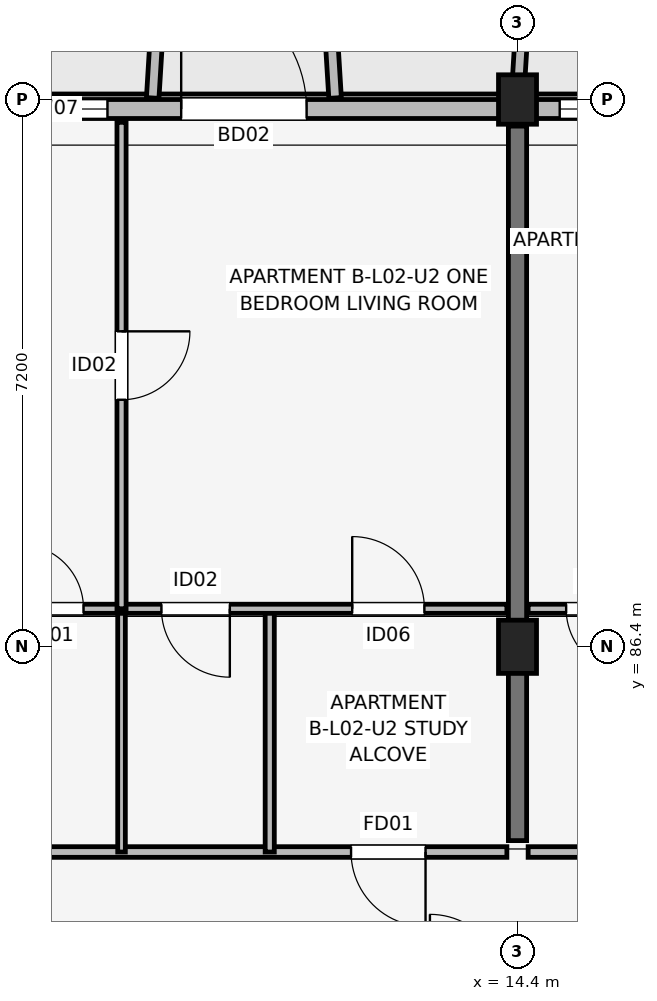
"""IFC4 building model, lengths in metres.
Left out: names, types, materials, properties, quantities, classifications, styles, units other than length and angle.
Written with IfcOpenShell. Run it as: python <this file> out.ifc"""

import sys

from ifc_helpers import new_model, si_unit, direction, frame, frame_2d, origin, origin_2d, place, context, subcontext, project, spatial, rectangle, extrude, element, fill, save


model = new_model("IFC4")
c1 = context("Model", 3, precision=1e-05, world=origin(), true_north=direction((0.0, 1.0)))
c2 = subcontext(c1, "Body", "Model", "MODEL_VIEW")
j1 = project(units=[si_unit("LENGTHUNIT", "METRE"), si_unit("PLANEANGLEUNIT", "RADIAN")], contexts=[c1])
p1 = place(None, origin())
s1 = spatial("IfcSite", under=j1, at=p1, CompositionType="ELEMENT")
p2 = place(p1, origin())
s2 = spatial("IfcBuilding", under=s1, at=p2, CompositionType="ELEMENT")
p3 = place(p2, frame((0.0, 0.0, 8.7)))
s3 = spatial("IfcBuildingStorey", under=s2, at=p3, CompositionType="ELEMENT", Elevation=8.7)
p4 = place(p3, frame((14.4, 86.4, 0.0), z_axis=(0.0, 0.0, 1.0), x_axis=(1.0, 0.0, 0.0)))
e1 = element("IfcColumn", 1, at=p4, inside=s3, PredefinedType="COLUMN", context=c2, shape_type="SweptSolid", body=[
    extrude(rectangle(XDim=0.5, YDim=0.7, at=origin_2d()), origin(), (0.0, 0.0, 1.0), 3.15),
])
p5 = place(p3, frame((14.4, 93.6, 0.0), z_axis=(0.0, 0.0, 1.0), x_axis=(1.0, 0.0, 0.0)))
e2 = element("IfcColumn", 2, at=p5, inside=s3, PredefinedType="COLUMN", context=c2, shape_type="SweptSolid", body=[
    extrude(rectangle(XDim=0.5, YDim=0.65, at=origin_2d()), origin(), (0.0, 0.0, 1.0), 3.15),
])
p6 = place(p3, frame((14.4, 83.85, 0.0), z_axis=(0.0, 0.0, 1.0), x_axis=(0.0, 1.0, 0.0)))
e3 = element("IfcWall", 3, at=p6, inside=s3, PredefinedType="SHEAR", context=c2, shape_type="SweptSolid", body=[
    extrude(rectangle(XDim=9.4, YDim=0.24, at=frame_2d((4.7, 0.0))), origin(), (0.0, 0.0, 1.0), 3.15),
])
p7 = place(p3, frame((32.8, 93.475, 0.0), z_axis=(0.0, 0.0, 1.0), x_axis=(-1.0, 0.0, 0.0)))
e4 = element("IfcWall", 4, at=p7, inside=s3, PredefinedType="SOLIDWALL", context=c2, shape_type="SweptSolid", body=[
    extrude(rectangle(XDim=29.6, YDim=0.25, at=frame_2d((14.8, 0.0))), origin(), (0.0, 0.0, 1.0), 2.43),
])
p8 = place(p7, frame((22.825, 0.0, 0.0), z_axis=(0.0, 0.0, 1.0), x_axis=(-1.0, 0.0, 0.0)))
e5 = element("IfcOpeningElement", 5, at=p8, cuts=e4, PredefinedType="OPENING", context=c2, shape_type="SweptSolid", body=[
    extrude(rectangle(XDim=1.65, YDim=2.15, at=frame_2d((0.825, 1.075))), frame((0.0, 0.135, 0.0), z_axis=(0.0, -1.0, 0.0), x_axis=(1.0, 0.0, 0.0)), (0.0, 0.0, 1.0), 0.27),
])
p9 = place(p7, frame((8.35, 0.0, 0.0), z_axis=(0.0, 0.0, 1.0), x_axis=(-1.0, 0.0, 0.0)))
e6 = element("IfcOpeningElement", 6, at=p9, cuts=e4, PredefinedType="OPENING", context=c2, shape_type="SweptSolid", body=[
    extrude(rectangle(XDim=1.5, YDim=2.15, at=frame_2d((0.75, 1.075))), frame((0.0, 0.135, 0.0), z_axis=(0.0, -1.0, 0.0), x_axis=(1.0, 0.0, 0.0)), (0.0, 0.0, 1.0), 0.27),
])
p10 = place(p7, frame((26.025, 0.0, 0.75)))
e7 = element("IfcOpeningElement", 7, at=p10, cuts=e4, PredefinedType="OPENING", context=c2, shape_type="SweptSolid", body=[
    extrude(rectangle(XDim=1.22, YDim=1.5, at=frame_2d((0.61, 0.75))), frame((0.0, 0.135, 0.0), z_axis=(0.0, -1.0, 0.0), x_axis=(1.0, 0.0, 0.0)), (0.0, 0.0, 1.0), 0.27),
])
p11 = place(p7, frame((23.795, 0.0, 0.75)))
e8 = element("IfcOpeningElement", 8, at=p11, cuts=e4, PredefinedType="OPENING", context=c2, shape_type="SweptSolid", body=[
    extrude(rectangle(XDim=1.34, YDim=1.55, at=frame_2d((0.67, 0.775))), frame((0.0, 0.135, 0.0), z_axis=(0.0, -1.0, 0.0), x_axis=(1.0, 0.0, 0.0)), (0.0, 0.0, 1.0), 0.27),
])
p12 = place(p7, frame((16.265, 0.0, 0.7)))
e9 = element("IfcOpeningElement", 9, at=p12, cuts=e4, PredefinedType="OPENING", context=c2, shape_type="SweptSolid", body=[
    extrude(rectangle(XDim=1.58, YDim=1.6, at=frame_2d((0.79, 0.8))), frame((0.0, 0.135, 0.0), z_axis=(0.0, -1.0, 0.0), x_axis=(1.0, 0.0, 0.0)), (0.0, 0.0, 1.0), 0.27),
])
p13 = place(p7, frame((12.245, 0.0, 0.75)))
e10 = element("IfcOpeningElement", 10, at=p13, cuts=e4, PredefinedType="OPENING", context=c2, shape_type="SweptSolid", body=[
    extrude(rectangle(XDim=0.6, YDim=1.25, at=frame_2d((0.3, 0.625))), frame((0.0, 0.135, 0.0), z_axis=(0.0, -1.0, 0.0), x_axis=(1.0, 0.0, 0.0)), (0.0, 0.0, 1.0), 0.27),
])
p14 = place(p7, frame((9.705, 0.0, 0.75)))
e11 = element("IfcOpeningElement", 11, at=p14, cuts=e4, PredefinedType="OPENING", context=c2, shape_type="SweptSolid", body=[
    extrude(rectangle(XDim=0.72, YDim=1.35, at=frame_2d((0.36, 0.675))), frame((0.0, 0.135, 0.0), z_axis=(0.0, -1.0, 0.0), x_axis=(1.0, 0.0, 0.0)), (0.0, 0.0, 1.0), 0.27),
])
p15 = place(p7, frame((2.44, 0.0, 0.75)))
e12 = element("IfcOpeningElement", 12, at=p15, cuts=e4, PredefinedType="OPENING", context=c2, shape_type="SweptSolid", body=[
    extrude(rectangle(XDim=0.85, YDim=1.4, at=frame_2d((0.425, 0.7))), frame((0.0, 0.135, 0.0), z_axis=(0.0, -1.0, 0.0), x_axis=(1.0, 0.0, 0.0)), (0.0, 0.0, 1.0), 0.27),
])
for number, where, z_axis, x_axis in (
    (13, (9.6, 93.62, 0.0), (0.0, 0.0, 1.0), (0.061, 0.998, 0.0)),
    (14, (12.0, 93.62, 0.0), (0.0, 0.0, 1.0), (-0.061, 0.998, 0.0)),
):
    element("IfcWall", number, at=place(p3, frame(where, z_axis=z_axis, x_axis=x_axis)), inside=s3, PredefinedType="ELEMENTEDWALL", context=c2, shape_type="SweptSolid", body=[
        extrude(rectangle(XDim=1.964, YDim=0.165, at=frame_2d((0.982, 0.0))), origin(), (0.0, 0.0, 1.0), 2.55),
    ])
p16 = place(p3, frame((14.4, 93.62, 0.0), z_axis=(0.0, 0.0, 1.0), x_axis=(0.061170732449, 0.998127317276, 0.0)))
e15 = element("IfcWall", 15, at=p16, inside=s3, PredefinedType="ELEMENTEDWALL", context=c2, shape_type="SweptSolid", body=[
    extrude(rectangle(XDim=1.964, YDim=0.165, at=frame_2d((0.982, 0.0))), origin(), (0.0, 0.0, 1.0), 2.95),
])
p17 = place(p3, frame((7.34, 83.7, 0.0), z_axis=(0.0, 0.0, 1.0), x_axis=(1.0, 0.0, 0.0)))
e16 = element("IfcWall", 16, at=p17, inside=s3, PredefinedType="PARTITIONING", context=c2, shape_type="SweptSolid", body=[
    extrude(rectangle(XDim=6.92, YDim=0.14, at=frame_2d((3.46, 0.0))), origin(), (0.0, 0.0, 1.0), 2.38),
])
p18 = place(p17, frame((5.85, 0.0, 0.0), z_axis=(0.0, 0.0, 1.0), x_axis=(-1.0, 0.0, 0.0)))
e17 = element("IfcOpeningElement", 17, at=p18, cuts=e16, PredefinedType="OPENING", context=c2, shape_type="SweptSolid", body=[
    extrude(rectangle(XDim=0.98, YDim=2.1, at=frame_2d((0.49, 1.05))), frame((0.0, 0.08, 0.0), z_axis=(0.0, -1.0, 0.0), x_axis=(1.0, 0.0, 0.0)), (0.0, 0.0, 1.0), 0.16),
])
p19 = place(p3, frame((9.19, 83.7, 0.0), z_axis=(0.0, 0.0, 1.0), x_axis=(0.0, 1.0, 0.0)))
e18 = element("IfcWall", 18, at=p19, inside=s3, PredefinedType="PARTITIONING", context=c2, shape_type="SweptSolid", body=[
    extrude(rectangle(XDim=3.2, YDim=0.1, at=frame_2d((1.6, 0.0))), origin(), (0.0, 0.0, 1.0), 2.375),
])
p20 = place(p3, frame((11.14, 83.7, 0.0), z_axis=(0.0, 0.0, 1.0), x_axis=(0.0, 1.0, 0.0)))
e19 = element("IfcWall", 19, at=p20, inside=s3, PredefinedType="PARTITIONING", context=c2, shape_type="SweptSolid", body=[
    extrude(rectangle(XDim=3.2, YDim=0.12, at=frame_2d((1.6, 0.0))), origin(), (0.0, 0.0, 1.0), 2.375),
])
p21 = place(p3, frame((7.34, 86.9, 0.0), z_axis=(0.0, 0.0, 1.0), x_axis=(1.0, 0.0, 0.0)))
e20 = element("IfcWall", 20, at=p21, inside=s3, PredefinedType="PARTITIONING", context=c2, shape_type="SweptSolid", body=[
    extrude(rectangle(XDim=6.92, YDim=0.12, at=frame_2d((3.46, 0.0))), origin(), (0.0, 0.0, 1.0), 2.38),
])
p22 = place(p21, frame((0.5, 0.0, 0.0)))
e21 = element("IfcOpeningElement", 21, at=p22, cuts=e20, PredefinedType="OPENING", context=c2, shape_type="SweptSolid", body=[
    extrude(rectangle(XDim=0.85, YDim=2.08, at=frame_2d((0.425, 1.04))), frame((0.0, 0.07, 0.0), z_axis=(0.0, -1.0, 0.0), x_axis=(1.0, 0.0, 0.0)), (0.0, 0.0, 1.0), 0.14),
])
p23 = place(p21, frame((3.275, 0.0, 0.0), z_axis=(0.0, 0.0, 1.0), x_axis=(-1.0, 0.0, 0.0)))
e22 = element("IfcOpeningElement", 22, at=p23, cuts=e20, PredefinedType="OPENING", context=c2, shape_type="SweptSolid", body=[
    extrude(rectangle(XDim=0.9, YDim=2.08, at=frame_2d((0.45, 1.04))), frame((0.0, 0.07, 0.0), z_axis=(0.0, -1.0, 0.0), x_axis=(1.0, 0.0, 0.0)), (0.0, 0.0, 1.0), 0.14),
])
p24 = place(p21, frame((4.885, 0.0, 0.0)))
e23 = element("IfcOpeningElement", 23, at=p24, cuts=e20, PredefinedType="OPENING", context=c2, shape_type="SweptSolid", body=[
    extrude(rectangle(XDim=0.95, YDim=2.08, at=frame_2d((0.475, 1.04))), frame((0.0, 0.07, 0.0), z_axis=(0.0, -1.0, 0.0), x_axis=(1.0, 0.0, 0.0)), (0.0, 0.0, 1.0), 0.14),
])
p25 = place(p3, frame((9.19, 86.9, 0.0), z_axis=(0.0, 0.0, 1.0), x_axis=(0.0, 1.0, 0.0)))
e24 = element("IfcWall", 24, at=p25, inside=s3, PredefinedType="PARTITIONING", context=c2, shape_type="SweptSolid", body=[
    extrude(rectangle(XDim=6.4, YDim=0.12, at=frame_2d((3.2, 0.0))), origin(), (0.0, 0.0, 1.0), 2.38),
])
p26 = place(p25, frame((3.65, 0.0, 0.0), z_axis=(0.0, 0.0, 1.0), x_axis=(-1.0, 0.0, 0.0)))
e25 = element("IfcOpeningElement", 25, at=p26, cuts=e24, PredefinedType="OPENING", context=c2, shape_type="SweptSolid", body=[
    extrude(rectangle(XDim=0.9, YDim=2.08, at=frame_2d((0.45, 1.04))), frame((0.0, 0.07, 0.0), z_axis=(0.0, -1.0, 0.0), x_axis=(1.0, 0.0, 0.0)), (0.0, 0.0, 1.0), 0.14),
])
p27 = place(p3, frame((14.54, 83.7, 0.0), z_axis=(0.0, 0.0, 1.0), x_axis=(1.0, 0.0, 0.0)))
e26 = element("IfcWall", 26, at=p27, inside=s3, PredefinedType="PARTITIONING", context=c2, shape_type="SweptSolid", body=[
    extrude(rectangle(XDim=6.92, YDim=0.14, at=frame_2d((3.46, 0.0))), origin(), (0.0, 0.0, 1.0), 2.38),
])
p28 = place(p27, frame((5.02, 0.0, 0.0)))
e27 = element("IfcOpeningElement", 27, at=p28, cuts=e26, PredefinedType="OPENING", context=c2, shape_type="SweptSolid", body=[
    extrude(rectangle(XDim=0.98, YDim=2.1, at=frame_2d((0.49, 1.05))), frame((0.0, 0.08, 0.0), z_axis=(0.0, -1.0, 0.0), x_axis=(1.0, 0.0, 0.0)), (0.0, 0.0, 1.0), 0.16),
])
p29 = place(p3, frame((14.54, 86.9, 0.0), z_axis=(0.0, 0.0, 1.0), x_axis=(1.0, 0.0, 0.0)))
e28 = element("IfcWall", 28, at=p29, inside=s3, PredefinedType="PARTITIONING", context=c2, shape_type="SweptSolid", body=[
    extrude(rectangle(XDim=6.92, YDim=0.12, at=frame_2d((3.46, 0.0))), origin(), (0.0, 0.0, 1.0), 2.38),
])
p30 = place(p29, frame((1.35, 0.0, 0.0), z_axis=(0.0, 0.0, 1.0), x_axis=(-1.0, 0.0, 0.0)))
e29 = element("IfcOpeningElement", 29, at=p30, cuts=e28, PredefinedType="OPENING", context=c2, shape_type="SweptSolid", body=[
    extrude(rectangle(XDim=0.85, YDim=2.08, at=frame_2d((0.425, 1.04))), frame((0.0, 0.07, 0.0), z_axis=(0.0, -1.0, 0.0), x_axis=(1.0, 0.0, 0.0)), (0.0, 0.0, 1.0), 0.14),
])
p31 = place(p29, frame((2.525, 0.0, 0.0)))
e30 = element("IfcOpeningElement", 30, at=p31, cuts=e28, PredefinedType="OPENING", context=c2, shape_type="SweptSolid", body=[
    extrude(rectangle(XDim=0.9, YDim=2.08, at=frame_2d((0.45, 1.04))), frame((0.0, 0.07, 0.0), z_axis=(0.0, -1.0, 0.0), x_axis=(1.0, 0.0, 0.0)), (0.0, 0.0, 1.0), 0.14),
])
p32 = place(p29, frame((5.985, 0.0, 0.0), z_axis=(0.0, 0.0, 1.0), x_axis=(-1.0, 0.0, 0.0)))
e31 = element("IfcOpeningElement", 31, at=p32, cuts=e28, PredefinedType="OPENING", context=c2, shape_type="SweptSolid", body=[
    extrude(rectangle(XDim=0.95, YDim=2.08, at=frame_2d((0.475, 1.04))), frame((0.0, 0.07, 0.0), z_axis=(0.0, -1.0, 0.0), x_axis=(1.0, 0.0, 0.0)), (0.0, 0.0, 1.0), 0.14),
])
p33 = place(p8, origin())
e32 = element("IfcDoor", 32, at=p33, inside=s3, OperationType="SINGLE_SWING_RIGHT", PredefinedType="DOOR", context=c2, shape_type="SweptSolid", body=[
    extrude(rectangle(XDim=1.65, YDim=2.15, at=frame_2d((0.825, 1.075))), frame((0.0, 0.025, 0.0), z_axis=(0.0, -1.0, 0.0), x_axis=(1.0, 0.0, 0.0)), (0.0, 0.0, 1.0), 0.05),
])
fill(e5, e32)
p34 = place(p11, origin())
e33 = element("IfcWindow", 33, at=p34, inside=s3, PartitioningType="SINGLE_PANEL", PredefinedType="WINDOW", context=c2, shape_type="SweptSolid", body=[
    extrude(rectangle(XDim=1.34, YDim=1.55, at=frame_2d((0.67, 0.775))), frame((0.0, 0.03, 0.0), z_axis=(0.0, -1.0, 0.0), x_axis=(1.0, 0.0, 0.0)), (0.0, 0.0, 1.0), 0.06),
])
fill(e8, e33)
p35 = place(p12, origin())
e34 = element("IfcWindow", 34, at=p35, inside=s3, PartitioningType="SINGLE_PANEL", PredefinedType="WINDOW", context=c2, shape_type="SweptSolid", body=[
    extrude(rectangle(XDim=1.58, YDim=1.6, at=frame_2d((0.79, 0.8))), frame((0.0, 0.03, 0.0), z_axis=(0.0, -1.0, 0.0), x_axis=(1.0, 0.0, 0.0)), (0.0, 0.0, 1.0), 0.06),
])
fill(e9, e34)
p36 = place(p18, origin())
e35 = element("IfcDoor", 35, at=p36, inside=s3, OperationType="SINGLE_SWING_RIGHT", PredefinedType="DOOR", context=c2, shape_type="SweptSolid", body=[
    extrude(rectangle(XDim=0.98, YDim=2.1, at=frame_2d((0.49, 1.05))), frame((0.0, 0.025, 0.0), z_axis=(0.0, -1.0, 0.0), x_axis=(1.0, 0.0, 0.0)), (0.0, 0.0, 1.0), 0.05),
])
fill(e17, e35)
p37 = place(p22, origin())
e36 = element("IfcDoor", 36, at=p37, inside=s3, OperationType="SINGLE_SWING_LEFT", PredefinedType="DOOR", context=c2, shape_type="SweptSolid", body=[
    extrude(rectangle(XDim=0.85, YDim=2.08, at=frame_2d((0.425, 1.04))), frame((0.0, 0.025, 0.0), z_axis=(0.0, -1.0, 0.0), x_axis=(1.0, 0.0, 0.0)), (0.0, 0.0, 1.0), 0.05),
])
fill(e21, e36)
p38 = place(p23, origin())
e37 = element("IfcDoor", 37, at=p38, inside=s3, OperationType="SINGLE_SWING_RIGHT", PredefinedType="DOOR", context=c2, shape_type="SweptSolid", body=[
    extrude(rectangle(XDim=0.9, YDim=2.08, at=frame_2d((0.45, 1.04))), frame((0.0, 0.025, 0.0), z_axis=(0.0, -1.0, 0.0), x_axis=(1.0, 0.0, 0.0)), (0.0, 0.0, 1.0), 0.05),
])
fill(e22, e37)
p39 = place(p24, origin())
e38 = element("IfcDoor", 38, at=p39, inside=s3, OperationType="SINGLE_SWING_LEFT", PredefinedType="DOOR", context=c2, shape_type="SweptSolid", body=[
    extrude(rectangle(XDim=0.95, YDim=2.08, at=frame_2d((0.475, 1.04))), frame((0.0, 0.025, 0.0), z_axis=(0.0, -1.0, 0.0), x_axis=(1.0, 0.0, 0.0)), (0.0, 0.0, 1.0), 0.05),
])
fill(e23, e38)
p40 = place(p26, origin())
e39 = element("IfcDoor", 39, at=p40, inside=s3, OperationType="SINGLE_SWING_RIGHT", PredefinedType="DOOR", context=c2, shape_type="SweptSolid", body=[
    extrude(rectangle(XDim=0.9, YDim=2.08, at=frame_2d((0.45, 1.04))), frame((0.0, 0.025, 0.0), z_axis=(0.0, -1.0, 0.0), x_axis=(1.0, 0.0, 0.0)), (0.0, 0.0, 1.0), 0.05),
])
fill(e25, e39)
p41 = place(p30, origin())
e40 = element("IfcDoor", 40, at=p41, inside=s3, OperationType="SINGLE_SWING_RIGHT", PredefinedType="DOOR", context=c2, shape_type="SweptSolid", body=[
    extrude(rectangle(XDim=0.85, YDim=2.08, at=frame_2d((0.425, 1.04))), frame((0.0, 0.025, 0.0), z_axis=(0.0, -1.0, 0.0), x_axis=(1.0, 0.0, 0.0)), (0.0, 0.0, 1.0), 0.05),
])
fill(e29, e40)
save(model, sys.argv[1])
